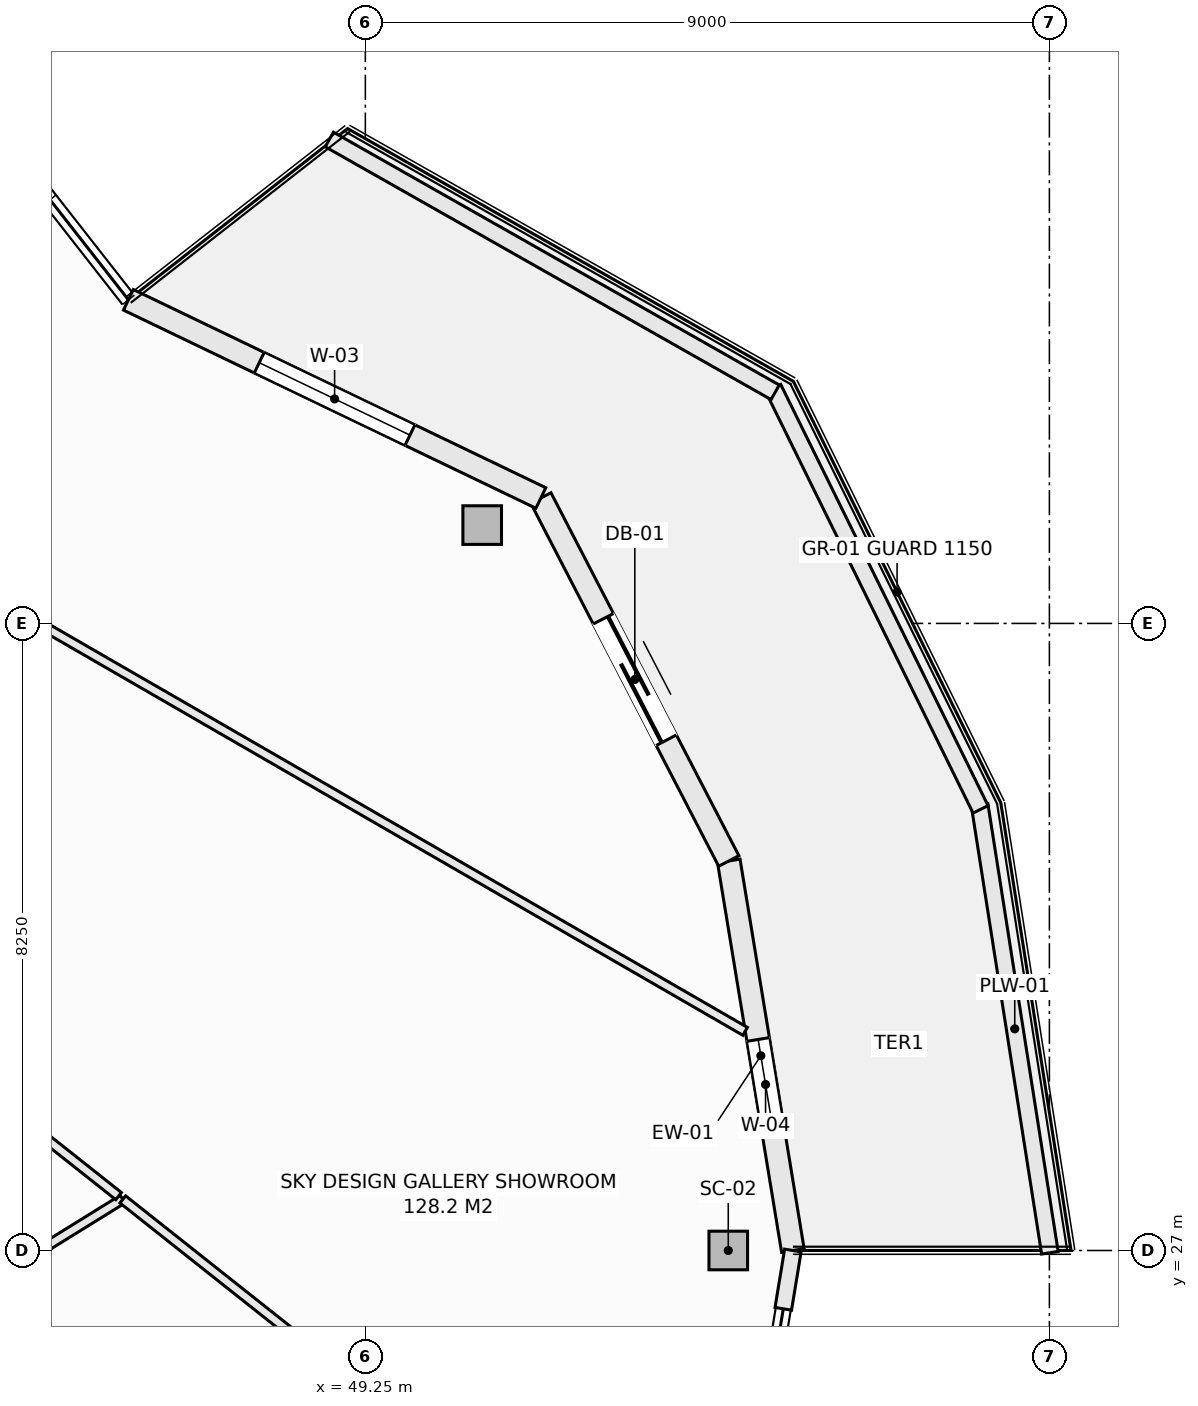
"""IFC4 building model, lengths in metres.
Left out: names, types, materials, properties, quantities, classifications, styles, units other than length and angle.
Written with IfcOpenShell. Run it as: python <this file> out.ifc"""

import sys

from ifc_helpers import new_model, si_unit, direction, frame, frame_2d, origin, origin_2d, place, context, subcontext, project, spatial, rectangle, hollow_rectangle, extrude, element, fill, save


model = new_model("IFC4")
c1 = context("Model", 3, precision=1e-05, world=origin(), true_north=direction((0.0, 1.0)))
c2 = subcontext(c1, "Body", "Model", "MODEL_VIEW")
j1 = project(units=[si_unit("LENGTHUNIT", "METRE"), si_unit("PLANEANGLEUNIT", "RADIAN")], contexts=[c1])
p1 = place(None, origin())
s1 = spatial("IfcSite", under=j1, at=p1, CompositionType="ELEMENT")
p2 = place(p1, origin())
s2 = spatial("IfcBuilding", under=s1, at=p2, CompositionType="ELEMENT")
p3 = place(p2, frame((0.0, 0.0, 191.9)))
s3 = spatial("IfcBuildingStorey", under=s2, at=p3, CompositionType="ELEMENT", Elevation=191.9)
for number, where, z_axis, x_axis in (
    (1, (54.025, 27.0, -0.28), (0.0, 0.0, 1.0), (1.0, 0.0, 0.0)),
    (2, (50.787, 36.544, -0.28), (0.0, 0.0, 1.0), (1.0, 0.0, 0.0)),
):
    element("IfcColumn", number, at=place(p3, frame(where, z_axis=z_axis, x_axis=x_axis)), inside=s3, PredefinedType="COLUMN", context=c2, shape_type="SweptSolid", body=[
        extrude(hollow_rectangle(XDim=0.508, YDim=0.508, WallThickness=0.019, at=origin_2d()), origin(), (0.0, 0.0, 1.0), 4.51),
    ])
p4 = place(p3, frame((54.032, 32.125, 0.0), z_axis=(0.0, 0.0, 1.0), x_axis=(0.16237087798, -0.986729799886, 0.0)))
e3 = element("IfcWall", 3, at=p4, inside=s3, PredefinedType="SOLIDWALL", context=c2, shape_type="SweptSolid", body=[
    extrude(rectangle(XDim=5.193, YDim=0.3, at=frame_2d((2.597, 0.0))), origin(), (0.0, 0.0, 1.0), 3.805),
])
p5 = place(p4, frame((2.38, 0.0, 0.72)))
e4 = element("IfcOpeningElement", 4, at=p5, cuts=e3, PredefinedType="OPENING", context=c2, shape_type="SweptSolid", body=[
    extrude(rectangle(XDim=1.2, YDim=1.65, at=frame_2d((0.6, 0.825))), frame((0.0, 0.16, 0.0), z_axis=(0.0, -1.0, 0.0), x_axis=(1.0, 0.0, 0.0)), (0.0, 0.0, 1.0), 0.32),
])
p6 = place(p3, frame((51.559, 36.9, 0.0), z_axis=(0.0, 0.0, 1.0), x_axis=(0.459808219482, -0.888018243786, 0.0)))
e5 = element("IfcWall", 5, at=p6, inside=s3, PredefinedType="SOLIDWALL", context=c2, shape_type="SweptSolid", body=[
    extrude(rectangle(XDim=5.378, YDim=0.3, at=frame_2d((2.689, 0.0))), origin(), (0.0, 0.0, 1.0), 3.805),
])
p7 = place(p6, frame((1.789, 0.0, 0.0)))
e6 = element("IfcOpeningElement", 6, at=p7, cuts=e5, PredefinedType="OPENING", context=c2, shape_type="SweptSolid", body=[
    extrude(rectangle(XDim=1.8, YDim=2.25, at=frame_2d((0.9, 1.125))), frame((0.0, 0.16, 0.0), z_axis=(0.0, -1.0, 0.0), x_axis=(1.0, 0.0, 0.0)), (0.0, 0.0, 1.0), 0.32),
])
p8 = place(p3, frame((46.133, 39.507, 0.0), z_axis=(0.0, 0.0, 1.0), x_axis=(0.901348331142, -0.433094892545, 0.0)))
e7 = element("IfcWall", 7, at=p8, inside=s3, PredefinedType="SOLIDWALL", context=c2, shape_type="SweptSolid", body=[
    extrude(rectangle(XDim=6.021, YDim=0.3, at=frame_2d((3.01, 0.0))), origin(), (0.0, 0.0, 1.0), 3.805),
])
p9 = place(p8, frame((1.91, 0.0, 0.72)))
e8 = element("IfcOpeningElement", 8, at=p9, cuts=e7, PredefinedType="OPENING", context=c2, shape_type="SweptSolid", body=[
    extrude(rectangle(XDim=2.2, YDim=1.65, at=frame_2d((1.1, 0.825))), frame((0.0, 0.16, 0.0), z_axis=(0.0, -1.0, 0.0), x_axis=(1.0, 0.0, 0.0)), (0.0, 0.0, 1.0), 0.32),
])
p10 = place(p3, frame((54.749, 26.233, 0.0), z_axis=(0.0, 0.0, 1.0), x_axis=(0.162361584084, 0.986731329194, 0.0)))
e9 = element("IfcWall", 9, at=p10, inside=s3, PredefinedType="SOLIDWALL", context=c2, shape_type="SweptSolid", body=[
    extrude(rectangle(XDim=0.777, YDim=0.22, at=frame_2d((0.389, 0.0))), origin(), (0.0, 0.0, 1.0), 3.805),
])
p11 = place(p3, frame((57.332, 32.862, 0.0), z_axis=(0.0, 0.0, 1.0), x_axis=(0.1550711793, -0.987903299595, 0.0)))
e10 = element("IfcWall", 10, at=p11, inside=s3, PredefinedType="PARAPET", context=c2, shape_type="SweptSolid", body=[
    extrude(rectangle(XDim=5.964, YDim=0.22, at=frame_2d((2.982, 0.0))), origin(), (0.0, 0.0, 1.0), 0.52),
])
p12 = place(p3, frame((54.616, 38.347, 0.0), z_axis=(0.0, 0.0, 1.0), x_axis=(0.441640961804, -0.897191875162, 0.0)))
e11 = element("IfcWall", 11, at=p12, inside=s3, PredefinedType="PARAPET", context=c2, shape_type="SweptSolid", body=[
    extrude(rectangle(XDim=6.178, YDim=0.22, at=frame_2d((3.089, 0.0))), origin(), (0.0, 0.0, 1.0), 0.52),
])
p13 = place(p3, frame((48.776, 41.617, 0.0), z_axis=(0.0, 0.0, 1.0), x_axis=(0.869860619267, -0.493297580623, 0.0)))
e12 = element("IfcWall", 12, at=p13, inside=s3, PredefinedType="PARAPET", context=c2, shape_type="SweptSolid", body=[
    extrude(rectangle(XDim=6.743, YDim=0.22, at=frame_2d((3.371, 0.0))), origin(), (0.0, 0.0, 1.0), 0.52),
])
p14 = place(p3, frame((38.962, 23.281, 0.0), z_axis=(0.0, 0.0, 1.0), x_axis=(0.850146039188, 0.526546970415, 0.0)))
e13 = element("IfcWall", 13, at=p14, inside=s3, PredefinedType="PARTITIONING", context=c2, shape_type="SweptSolid", body=[
    extrude(rectangle(XDim=8.345, YDim=0.12, at=frame_2d((4.172, 0.0))), origin(), (0.0, 0.0, 1.0), 3.678),
])
p15 = place(p3, frame((38.862, 33.376, 0.0), z_axis=(0.0, 0.0, 1.0), x_axis=(0.78368115762, -0.621163298329, 0.0)))
e14 = element("IfcWall", 14, at=p15, inside=s3, PredefinedType="PARTITIONING", context=c2, shape_type="SweptSolid", body=[
    extrude(rectangle(XDim=9.113, YDim=0.12, at=frame_2d((4.556, 0.0))), origin(), (0.0, 0.0, 1.0), 4.23),
])
p16 = place(p3, frame((46.059, 27.672, 0.0), z_axis=(0.0, 0.0, 1.0), x_axis=(0.783665181, -0.621183454455, 0.0)))
e15 = element("IfcWall", 15, at=p16, inside=s3, PredefinedType="PARTITIONING", context=c2, shape_type="SweptSolid", body=[
    extrude(rectangle(XDim=7.364, YDim=0.12, at=frame_2d((3.682, 0.0))), origin(), (0.0, 0.0, 1.0), 3.678),
])
p17 = place(p3, frame((35.876, 40.488, 0.0), z_axis=(0.0, 0.0, 1.0), x_axis=(0.866056021905, -0.49994696411, 0.0)))
e16 = element("IfcWall", 16, at=p17, inside=s3, PredefinedType="PARTITIONING", context=c2, shape_type="SweptSolid", body=[
    extrude(rectangle(XDim=21.211, YDim=0.12, at=frame_2d((10.605, 0.0))), origin(), (0.0, 0.0, 1.0), 4.23),
])
p18 = place(p5, origin())
e17 = element("IfcWindow", 17, at=p18, inside=s3, PartitioningType="SINGLE_PANEL", PredefinedType="WINDOW", context=c2, shape_type="SweptSolid", body=[
    extrude(rectangle(XDim=1.2, YDim=1.65, at=frame_2d((0.6, 0.825))), frame((0.0, 0.03, 0.0), z_axis=(0.0, -1.0, 0.0), x_axis=(1.0, 0.0, 0.0)), (0.0, 0.0, 1.0), 0.06),
])
fill(e4, e17)
p19 = place(p7, origin())
e18 = element("IfcDoor", 18, at=p19, inside=s3, OperationType="SLIDING_TO_LEFT", PredefinedType="DOOR", context=c2, shape_type="SweptSolid", body=[
    extrude(rectangle(XDim=1.8, YDim=2.25, at=frame_2d((0.9, 1.125))), frame((0.0, 0.025, 0.0), z_axis=(0.0, -1.0, 0.0), x_axis=(1.0, 0.0, 0.0)), (0.0, 0.0, 1.0), 0.05),
])
fill(e6, e18)
p20 = place(p9, origin())
e19 = element("IfcWindow", 19, at=p20, inside=s3, PartitioningType="SINGLE_PANEL", PredefinedType="WINDOW", context=c2, shape_type="SweptSolid", body=[
    extrude(rectangle(XDim=2.2, YDim=1.65, at=frame_2d((1.1, 0.825))), frame((0.0, 0.03, 0.0), z_axis=(0.0, -1.0, 0.0), x_axis=(1.0, 0.0, 0.0)), (0.0, 0.0, 1.0), 0.06),
])
fill(e8, e19)
save(model, sys.argv[1])
